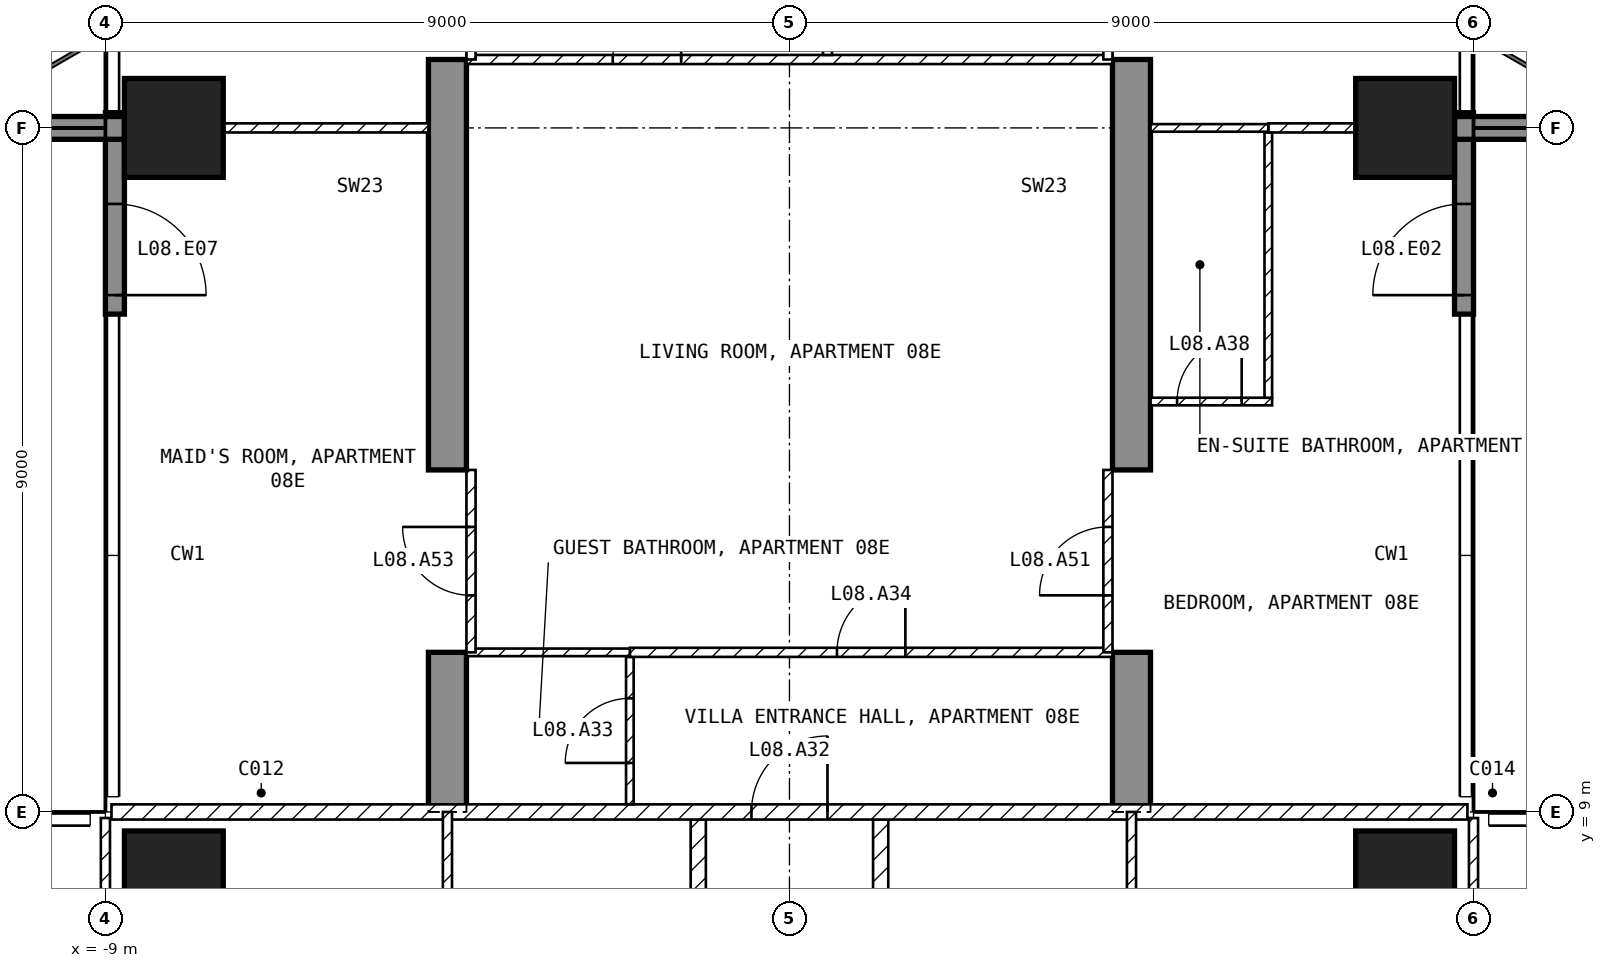
"""IFC4 building model, lengths in metres.
Left out: names, types, materials, properties, quantities, classifications, styles, units other than length and angle.
Written with IfcOpenShell. Run it as: python <this file> out.ifc"""

import sys

from ifc_helpers import new_model, si_unit, direction, frame, frame_2d, origin, origin_2d, place, context, subcontext, project, spatial, polyline, rectangle, outline, extrude, element, fill, save


model = new_model("IFC4")
c1 = context("Model", 3, precision=1e-05, world=origin(), true_north=direction((0.0, 1.0)))
c2 = subcontext(c1, "Body", "Model", "MODEL_VIEW")
j1 = project(units=[si_unit("LENGTHUNIT", "METRE"), si_unit("PLANEANGLEUNIT", "RADIAN")], contexts=[c1])
p1 = place(None, origin())
s1 = spatial("IfcSite", under=j1, at=p1, CompositionType="ELEMENT")
p2 = place(p1, origin())
s2 = spatial("IfcBuilding", under=s1, at=p2, CompositionType="ELEMENT")
p3 = place(p2, frame((0.0, 0.0, 47.0)))
s3 = spatial("IfcBuildingStorey", under=s2, at=p3, CompositionType="ELEMENT", Elevation=47.0)
for number, where, z_axis, x_axis in (
    (1, (-8.1, 8.1, -0.25), (0.0, 0.0, 1.0), (1.0, 0.0, 0.0)),
    (2, (-8.1, 18.0, -0.25), (0.0, 0.0, 1.0), (1.0, 0.0, 0.0)),
    (3, (8.1, 8.1, -0.25), (0.0, 0.0, 1.0), (1.0, 0.0, 0.0)),
    (4, (8.1, 18.0, -0.25), (0.0, 0.0, 1.0), (1.0, 0.0, 0.0)),
):
    element("IfcColumn", number, at=place(p3, frame(where, z_axis=z_axis, x_axis=x_axis)), inside=s3, PredefinedType="COLUMN", context=c2, shape_type="SweptSolid", body=[
        extrude(rectangle(XDim=1.3, YDim=1.3, at=origin_2d()), origin(), (0.0, 0.0, 1.0), 3.5),
    ])
for number, where, z_axis, x_axis in (
    (5, (-4.75, 9.0, -0.25), (1.0, 0.0, 0.0), (0.0, 1.0, 0.0)),
    (6, (4.25, 9.0, -0.25), (1.0, 0.0, 0.0), (0.0, 1.0, 0.0)),
):
    element("IfcWall", number, at=place(p3, frame(where, z_axis=z_axis, x_axis=x_axis)), inside=s3, PredefinedType="SHEAR", context=c2, shape_type="SweptSolid", body=[
        extrude(outline(polyline([(0.0, 0.0), (2.1, 0.0), (2.1, 2.65), (4.5, 2.65), (4.5, 0.0), (9.9, 0.0), (9.9, 2.65), (12.3, 2.65), (12.3, 0.0), (16.45, 0.0), (16.45, 3.5), (0.0, 3.5), (0.0, 0.0)])), origin(), (0.0, 0.0, 1.0), 0.5),
    ])
p4 = place(p3, frame((8.875, 15.55, 0.0), z_axis=(0.0, 0.0, 1.0), x_axis=(0.0, 1.0, 0.0)))
e7 = element("IfcWall", 7, at=p4, inside=s3, PredefinedType="SOLIDWALL", context=c2, shape_type="SweptSolid", body=[
    extrude(rectangle(XDim=2.65, YDim=0.25, at=frame_2d((1.325, 0.0))), origin(), (0.0, 0.0, 1.0), 3.25),
])
p5 = place(p4, frame((0.25, 0.0, 0.0)))
e8 = element("IfcOpeningElement", 8, at=p5, cuts=e7, PredefinedType="OPENING", context=c2, shape_type="SweptSolid", body=[
    extrude(rectangle(XDim=1.2, YDim=2.4, at=frame_2d((0.6, 1.2))), frame((0.0, 0.135, 0.0), z_axis=(0.0, -1.0, 0.0), x_axis=(1.0, 0.0, 0.0)), (0.0, 0.0, 1.0), 0.27),
])
p6 = place(p3, frame((-8.875, 18.2, 0.0), z_axis=(0.0, 0.0, 1.0), x_axis=(0.0, -1.0, 0.0)))
e9 = element("IfcWall", 9, at=p6, inside=s3, PredefinedType="SOLIDWALL", context=c2, shape_type="SweptSolid", body=[
    extrude(rectangle(XDim=2.65, YDim=0.25, at=frame_2d((1.325, 0.0))), origin(), (0.0, 0.0, 1.0), 3.25),
])
p7 = place(p6, frame((1.2, 0.0, 0.0)))
e10 = element("IfcOpeningElement", 10, at=p7, cuts=e9, PredefinedType="OPENING", context=c2, shape_type="SweptSolid", body=[
    extrude(rectangle(XDim=1.2, YDim=2.4, at=frame_2d((0.6, 1.2))), frame((0.0, 0.135, 0.0), z_axis=(0.0, -1.0, 0.0), x_axis=(1.0, 0.0, 0.0)), (0.0, 0.0, 1.0), 0.27),
])
for number, where, z_axis, x_axis in (
    (11, (-8.75, 18.0, 0.0), (0.0, 0.0, 1.0), (-1.0, 0.0, 0.0)),
    (12, (8.75, 18.0, 0.0), (0.0, 0.0, 1.0), (1.0, 0.0, 0.0)),
):
    element("IfcWall", number, at=place(p3, frame(where, z_axis=z_axis, x_axis=x_axis)), inside=s3, PredefinedType="SOLIDWALL", context=c2, shape_type="SweptSolid", body=[
        extrude(rectangle(XDim=2.95, YDim=0.3, at=frame_2d((1.475, 0.0))), origin(), (0.0, 0.0, 1.0), 3.25),
    ])
for number, where, z_axis, x_axis in (
    (13, (1.2, 8.9, 0.0), (0.0, 0.0, 1.0), (0.0, -1.0, 0.0)),
    (14, (-1.2, 1.3, 0.0), (0.0, 0.0, 1.0), (0.0, 1.0, 0.0)),
):
    element("IfcWall", number, at=place(p3, frame(where, z_axis=z_axis, x_axis=x_axis)), inside=s3, PredefinedType="PARTITIONING", context=c2, shape_type="SweptSolid", body=[
        extrude(rectangle(XDim=7.6, YDim=0.2, at=frame_2d((3.8, 0.0))), origin(), (0.0, 0.0, 1.0), 3.25),
    ])
p8 = place(p3, frame((-8.92, 9.0, 0.0), z_axis=(0.0, 0.0, 1.0), x_axis=(1.0, 0.0, 0.0)))
e15 = element("IfcWall", 15, at=p8, inside=s3, PredefinedType="PARTITIONING", context=c2, shape_type="SweptSolid", body=[
    extrude(rectangle(XDim=17.84, YDim=0.2, at=frame_2d((8.92, 0.0))), origin(), (0.0, 0.0, 1.0), 3.25),
])
p9 = place(p8, frame((8.42, 0.0, 0.0)))
e16 = element("IfcOpeningElement", 16, at=p9, cuts=e15, PredefinedType="OPENING", context=c2, shape_type="SweptSolid", body=[
    extrude(rectangle(XDim=1.0, YDim=2.1, at=frame_2d((0.5, 1.05))), frame((0.0, 0.11, 0.0), z_axis=(0.0, -1.0, 0.0), x_axis=(1.0, 0.0, 0.0)), (0.0, 0.0, 1.0), 0.22),
])
p10 = place(p3, frame((9.0, 1.3, 0.0), z_axis=(0.0, 0.0, 1.0), x_axis=(0.0, 1.0, 0.0)))
e17 = element("IfcWall", 17, at=p10, inside=s3, PredefinedType="PARTITIONING", context=c2, shape_type="SweptSolid", body=[
    extrude(rectangle(XDim=7.62, YDim=0.12, at=frame_2d((3.81, 0.0))), origin(), (0.0, 0.0, 1.0), 3.25),
])
p11 = place(p10, frame((0.85, 0.0, 0.0)))
e18 = element("IfcOpeningElement", 18, at=p11, cuts=e17, PredefinedType="OPENING", context=c2, shape_type="SweptSolid", body=[
    extrude(rectangle(XDim=0.9, YDim=2.1, at=frame_2d((0.45, 1.05))), frame((0.0, 0.07, 0.0), z_axis=(0.0, -1.0, 0.0), x_axis=(1.0, 0.0, 0.0)), (0.0, 0.0, 1.0), 0.14),
])
p12 = place(p3, frame((4.5, 1.3, 0.0), z_axis=(0.0, 0.0, 1.0), x_axis=(0.0, 1.0, 0.0)))
e19 = element("IfcWall", 19, at=p12, inside=s3, PredefinedType="PARTITIONING", context=c2, shape_type="SweptSolid", body=[
    extrude(rectangle(XDim=7.7, YDim=0.12, at=frame_2d((3.85, 0.0))), origin(), (0.0, 0.0, 1.0), 3.25),
])
p13 = place(p12, frame((3.4, 0.0, 0.0)))
e20 = element("IfcOpeningElement", 20, at=p13, cuts=e19, PredefinedType="OPENING", context=c2, shape_type="SweptSolid", body=[
    extrude(rectangle(XDim=0.9, YDim=2.1, at=frame_2d((0.45, 1.05))), frame((0.0, 0.07, 0.0), z_axis=(0.0, -1.0, 0.0), x_axis=(1.0, 0.0, 0.0)), (0.0, 0.0, 1.0), 0.14),
])
p14 = place(p3, frame((-9.0, 8.92, 0.0), z_axis=(0.0, 0.0, 1.0), x_axis=(0.0, -1.0, 0.0)))
e21 = element("IfcWall", 21, at=p14, inside=s3, PredefinedType="PARTITIONING", context=c2, shape_type="SweptSolid", body=[
    extrude(rectangle(XDim=7.62, YDim=0.12, at=frame_2d((3.81, 0.0))), origin(), (0.0, 0.0, 1.0), 3.25),
])
p15 = place(p14, frame((2.67, 0.0, 0.0)))
e22 = element("IfcOpeningElement", 22, at=p15, cuts=e21, PredefinedType="OPENING", context=c2, shape_type="SweptSolid", body=[
    extrude(rectangle(XDim=0.9, YDim=2.1, at=frame_2d((0.45, 1.05))), frame((0.0, 0.07, 0.0), z_axis=(0.0, -1.0, 0.0), x_axis=(1.0, 0.0, 0.0)), (0.0, 0.0, 1.0), 0.14),
])
p16 = place(p3, frame((-4.5, 9.0, 0.0), z_axis=(0.0, 0.0, 1.0), x_axis=(0.0, -1.0, 0.0)))
e23 = element("IfcWall", 23, at=p16, inside=s3, PredefinedType="PARTITIONING", context=c2, shape_type="SweptSolid", body=[
    extrude(rectangle(XDim=3.9, YDim=0.12, at=frame_2d((1.95, 0.0))), origin(), (0.0, 0.0, 1.0), 3.25),
])
p17 = place(p16, frame((1.5, 0.0, 0.0)))
e24 = element("IfcOpeningElement", 24, at=p17, cuts=e23, PredefinedType="OPENING", context=c2, shape_type="SweptSolid", body=[
    extrude(rectangle(XDim=0.9, YDim=2.1, at=frame_2d((0.45, 1.05))), frame((0.0, 0.07, 0.0), z_axis=(0.0, -1.0, 0.0), x_axis=(1.0, 0.0, 0.0)), (0.0, 0.0, 1.0), 0.14),
])
p18 = place(p3, frame((-2.1, 9.1, 0.0), z_axis=(0.0, 0.0, 1.0), x_axis=(0.0, 1.0, 0.0)))
e25 = element("IfcWall", 25, at=p18, inside=s3, PredefinedType="PARTITIONING", context=c2, shape_type="SweptSolid", body=[
    extrude(rectangle(XDim=1.94, YDim=0.1, at=frame_2d((0.97, 0.0))), origin(), (0.0, 0.0, 1.0), 3.25),
])
p19 = place(p18, frame((0.545, 0.0, 0.0)))
e26 = element("IfcOpeningElement", 26, at=p19, cuts=e25, PredefinedType="OPENING", context=c2, shape_type="SweptSolid", body=[
    extrude(rectangle(XDim=0.85, YDim=2.1, at=frame_2d((0.425, 1.05))), frame((0.0, 0.06, 0.0), z_axis=(0.0, -1.0, 0.0), x_axis=(1.0, 0.0, 0.0)), (0.0, 0.0, 1.0), 0.12),
])
p20 = place(p3, frame((-2.1, 11.1, 0.0), z_axis=(0.0, 0.0, 1.0), x_axis=(1.0, 0.0, 0.0)))
e27 = element("IfcWall", 27, at=p20, inside=s3, PredefinedType="PARTITIONING", context=c2, shape_type="SweptSolid", body=[
    extrude(rectangle(XDim=6.35, YDim=0.12, at=frame_2d((3.175, 0.0))), origin(), (0.0, 0.0, 1.0), 3.25),
])
p21 = place(p20, frame((2.725, 0.0, 0.0)))
e28 = element("IfcOpeningElement", 28, at=p21, cuts=e27, PredefinedType="OPENING", context=c2, shape_type="SweptSolid", body=[
    extrude(rectangle(XDim=0.9, YDim=2.1, at=frame_2d((0.45, 1.05))), frame((0.0, 0.07, 0.0), z_axis=(0.0, -1.0, 0.0), x_axis=(1.0, 0.0, 0.0)), (0.0, 0.0, 1.0), 0.14),
])
p22 = place(p3, frame((-4.25, 11.1, 0.0), z_axis=(0.0, 0.0, 1.0), x_axis=(1.0, 0.0, 0.0)))
e29 = element("IfcWall", 29, at=p22, inside=s3, PredefinedType="PARTITIONING", context=c2, shape_type="SweptSolid", body=[
    extrude(rectangle(XDim=2.15, YDim=0.1, at=frame_2d((1.075, 0.0))), origin(), (0.0, 0.0, 1.0), 3.25),
])
p23 = place(p3, frame((-4.25, 18.9, 0.0), z_axis=(0.0, 0.0, 1.0), x_axis=(1.0, 0.0, 0.0)))
e30 = element("IfcWall", 30, at=p23, inside=s3, PredefinedType="PARTITIONING", context=c2, shape_type="SweptSolid", body=[
    extrude(rectangle(XDim=8.5, YDim=0.12, at=frame_2d((4.25, 0.0))), origin(), (0.0, 0.0, 1.0), 3.25),
])
p24 = place(p23, frame((1.925, 0.0, 0.0)))
e31 = element("IfcOpeningElement", 31, at=p24, cuts=e30, PredefinedType="OPENING", context=c2, shape_type="SweptSolid", body=[
    extrude(rectangle(XDim=0.9, YDim=2.1, at=frame_2d((0.45, 1.05))), frame((0.0, 0.07, 0.0), z_axis=(0.0, -1.0, 0.0), x_axis=(1.0, 0.0, 0.0)), (0.0, 0.0, 1.0), 0.14),
])
p25 = place(p3, frame((0.5, 23.34, 0.0), z_axis=(0.0, 0.0, 1.0), x_axis=(0.0, -1.0, 0.0)))
e32 = element("IfcWall", 32, at=p25, inside=s3, PredefinedType="PARTITIONING", context=c2, shape_type="SweptSolid", body=[
    extrude(rectangle(XDim=4.38, YDim=0.12, at=frame_2d((2.19, 0.0))), origin(), (0.0, 0.0, 1.0), 3.25),
])
p26 = place(p25, frame((1.74, 0.0, 0.0)))
e33 = element("IfcOpeningElement", 33, at=p26, cuts=e32, PredefinedType="OPENING", context=c2, shape_type="SweptSolid", body=[
    extrude(rectangle(XDim=0.9, YDim=2.1, at=frame_2d((0.45, 1.05))), frame((0.0, 0.07, 0.0), z_axis=(0.0, -1.0, 0.0), x_axis=(1.0, 0.0, 0.0)), (0.0, 0.0, 1.0), 0.14),
])
p27 = place(p3, frame((4.75, 14.4, 0.0), z_axis=(0.0, 0.0, 1.0), x_axis=(1.0, 0.0, 0.0)))
e34 = element("IfcWall", 34, at=p27, inside=s3, PredefinedType="PARTITIONING", context=c2, shape_type="SweptSolid", body=[
    extrude(rectangle(XDim=1.6, YDim=0.1, at=frame_2d((0.8, 0.0))), origin(), (0.0, 0.0, 1.0), 3.25),
])
p28 = place(p27, frame((0.35, 0.0, 0.0)))
e35 = element("IfcOpeningElement", 35, at=p28, cuts=e34, PredefinedType="OPENING", context=c2, shape_type="SweptSolid", body=[
    extrude(rectangle(XDim=0.85, YDim=2.1, at=frame_2d((0.425, 1.05))), frame((0.0, 0.06, 0.0), z_axis=(0.0, -1.0, 0.0), x_axis=(1.0, 0.0, 0.0)), (0.0, 0.0, 1.0), 0.12),
])
p29 = place(p3, frame((6.3, 14.45, 0.0), z_axis=(0.0, 0.0, 1.0), x_axis=(0.0, 1.0, 0.0)))
e36 = element("IfcWall", 36, at=p29, inside=s3, PredefinedType="PARTITIONING", context=c2, shape_type="SweptSolid", body=[
    extrude(rectangle(XDim=3.49, YDim=0.1, at=frame_2d((1.745, 0.0))), origin(), (0.0, 0.0, 1.0), 3.25),
])
p30 = place(p3, frame((6.3, 18.0, 0.0), z_axis=(0.0, 0.0, 1.0), x_axis=(1.0, 0.0, 0.0)))
e37 = element("IfcWall", 37, at=p30, inside=s3, PredefinedType="PARTITIONING", context=c2, shape_type="SweptSolid", body=[
    extrude(rectangle(XDim=1.15, YDim=0.12, at=frame_2d((0.575, 0.0))), origin(), (0.0, 0.0, 1.0), 2.346),
])
p31 = place(p3, frame((4.75, 18.0, 0.0), z_axis=(0.0, 0.0, 1.0), x_axis=(1.0, 0.0, 0.0)))
e38 = element("IfcWall", 38, at=p31, inside=s3, PredefinedType="PARTITIONING", context=c2, shape_type="SweptSolid", body=[
    extrude(rectangle(XDim=1.55, YDim=0.1, at=frame_2d((0.775, 0.0))), origin(), (0.0, 0.0, 1.0), 2.346),
])
p32 = place(p3, frame((-7.45, 18.0, 0.0), z_axis=(0.0, 0.0, 1.0), x_axis=(1.0, 0.0, 0.0)))
e39 = element("IfcWall", 39, at=p32, inside=s3, PredefinedType="PARTITIONING", context=c2, shape_type="SweptSolid", body=[
    extrude(rectangle(XDim=2.7, YDim=0.12, at=frame_2d((1.35, 0.0))), origin(), (0.0, 0.0, 1.0), 2.346),
])
p33 = place(p3, frame((4.19, 11.1, 0.0), z_axis=(0.0, 0.0, 1.0), x_axis=(0.0, 1.0, 0.0)))
e40 = element("IfcWall", 40, at=p33, inside=s3, PredefinedType="PARTITIONING", context=c2, shape_type="SweptSolid", body=[
    extrude(rectangle(XDim=2.4, YDim=0.12, at=frame_2d((1.2, 0.0))), origin(), (0.0, 0.0, 1.0), 2.4),
])
p34 = place(p33, frame((0.75, 0.0, 0.0)))
e41 = element("IfcOpeningElement", 41, at=p34, cuts=e40, PredefinedType="OPENING", context=c2, shape_type="SweptSolid", body=[
    extrude(rectangle(XDim=0.9, YDim=2.1, at=frame_2d((0.45, 1.05))), frame((0.0, 0.07, 0.0), z_axis=(0.0, -1.0, 0.0), x_axis=(1.0, 0.0, 0.0)), (0.0, 0.0, 1.0), 0.14),
])
p35 = place(p3, frame((4.19, 18.9, 0.0), z_axis=(0.0, 0.0, 1.0), x_axis=(0.0, 1.0, 0.0)))
e42 = element("IfcWall", 42, at=p35, inside=s3, PredefinedType="PARTITIONING", context=c2, shape_type="SweptSolid", body=[
    extrude(rectangle(XDim=2.4, YDim=0.12, at=frame_2d((1.2, 0.0))), origin(), (0.0, 0.0, 1.0), 2.4),
])
p36 = place(p35, frame((0.75, 0.0, 0.0)))
e43 = element("IfcOpeningElement", 43, at=p36, cuts=e42, PredefinedType="OPENING", context=c2, shape_type="SweptSolid", body=[
    extrude(rectangle(XDim=0.9, YDim=2.1, at=frame_2d((0.45, 1.05))), frame((0.0, 0.07, 0.0), z_axis=(0.0, -1.0, 0.0), x_axis=(1.0, 0.0, 0.0)), (0.0, 0.0, 1.0), 0.14),
])
p37 = place(p3, frame((-4.19, 11.1, 0.0), z_axis=(0.0, 0.0, 1.0), x_axis=(0.0, 1.0, 0.0)))
e44 = element("IfcWall", 44, at=p37, inside=s3, PredefinedType="PARTITIONING", context=c2, shape_type="SweptSolid", body=[
    extrude(rectangle(XDim=2.4, YDim=0.12, at=frame_2d((1.2, 0.0))), origin(), (0.0, 0.0, 1.0), 2.4),
])
p38 = place(p37, frame((0.75, 0.0, 0.0)))
e45 = element("IfcOpeningElement", 45, at=p38, cuts=e44, PredefinedType="OPENING", context=c2, shape_type="SweptSolid", body=[
    extrude(rectangle(XDim=0.9, YDim=2.1, at=frame_2d((0.45, 1.05))), frame((0.0, 0.07, 0.0), z_axis=(0.0, -1.0, 0.0), x_axis=(1.0, 0.0, 0.0)), (0.0, 0.0, 1.0), 0.14),
])
p39 = place(p3, frame((-4.19, 18.9, 0.0), z_axis=(0.0, 0.0, 1.0), x_axis=(0.0, 1.0, 0.0)))
e46 = element("IfcWall", 46, at=p39, inside=s3, PredefinedType="PARTITIONING", context=c2, shape_type="SweptSolid", body=[
    extrude(rectangle(XDim=2.4, YDim=0.12, at=frame_2d((1.2, 0.0))), origin(), (0.0, 0.0, 1.0), 2.4),
])
p40 = place(p39, frame((0.75, 0.0, 0.0)))
e47 = element("IfcOpeningElement", 47, at=p40, cuts=e46, PredefinedType="OPENING", context=c2, shape_type="SweptSolid", body=[
    extrude(rectangle(XDim=0.9, YDim=2.1, at=frame_2d((0.45, 1.05))), frame((0.0, 0.07, 0.0), z_axis=(0.0, -1.0, 0.0), x_axis=(1.0, 0.0, 0.0)), (0.0, 0.0, 1.0), 0.14),
])
p41 = place(p5, origin())
e48 = element("IfcDoor", 48, at=p41, inside=s3, OperationType="SINGLE_SWING_LEFT", PredefinedType="DOOR", context=c2, shape_type="SweptSolid", body=[
    extrude(rectangle(XDim=1.2, YDim=2.4, at=frame_2d((0.6, 1.2))), frame((0.0, 0.025, 0.0), z_axis=(0.0, -1.0, 0.0), x_axis=(1.0, 0.0, 0.0)), (0.0, 0.0, 1.0), 0.05),
])
fill(e8, e48)
p42 = place(p7, origin())
e49 = element("IfcDoor", 49, at=p42, inside=s3, OperationType="SINGLE_SWING_RIGHT", PredefinedType="DOOR", context=c2, shape_type="SweptSolid", body=[
    extrude(rectangle(XDim=1.2, YDim=2.4, at=frame_2d((0.6, 1.2))), frame((0.0, 0.025, 0.0), z_axis=(0.0, -1.0, 0.0), x_axis=(1.0, 0.0, 0.0)), (0.0, 0.0, 1.0), 0.05),
])
fill(e10, e49)
p43 = place(p9, origin())
e50 = element("IfcDoor", 50, at=p43, inside=s3, OperationType="SINGLE_SWING_RIGHT", PredefinedType="DOOR", context=c2, shape_type="SweptSolid", body=[
    extrude(rectangle(XDim=1.0, YDim=2.1, at=frame_2d((0.5, 1.05))), frame((0.0, 0.025, 0.0), z_axis=(0.0, -1.0, 0.0), x_axis=(1.0, 0.0, 0.0)), (0.0, 0.0, 1.0), 0.05),
])
fill(e16, e50)
p44 = place(p19, origin())
e51 = element("IfcDoor", 51, at=p44, inside=s3, OperationType="SINGLE_SWING_LEFT", PredefinedType="DOOR", context=c2, shape_type="SweptSolid", body=[
    extrude(rectangle(XDim=0.85, YDim=2.1, at=frame_2d((0.425, 1.05))), frame((0.0, 0.025, 0.0), z_axis=(0.0, -1.0, 0.0), x_axis=(1.0, 0.0, 0.0)), (0.0, 0.0, 1.0), 0.05),
])
fill(e26, e51)
p45 = place(p21, origin())
e52 = element("IfcDoor", 52, at=p45, inside=s3, OperationType="SINGLE_SWING_RIGHT", PredefinedType="DOOR", context=c2, shape_type="SweptSolid", body=[
    extrude(rectangle(XDim=0.9, YDim=2.1, at=frame_2d((0.45, 1.05))), frame((0.0, 0.025, 0.0), z_axis=(0.0, -1.0, 0.0), x_axis=(1.0, 0.0, 0.0)), (0.0, 0.0, 1.0), 0.05),
])
fill(e28, e52)
p46 = place(p24, origin())
e53 = element("IfcDoor", 53, at=p46, inside=s3, OperationType="SINGLE_SWING_RIGHT", PredefinedType="DOOR", context=c2, shape_type="SweptSolid", body=[
    extrude(rectangle(XDim=0.9, YDim=2.1, at=frame_2d((0.45, 1.05))), frame((0.0, 0.025, 0.0), z_axis=(0.0, -1.0, 0.0), x_axis=(1.0, 0.0, 0.0)), (0.0, 0.0, 1.0), 0.05),
])
fill(e31, e53)
p47 = place(p28, origin())
e54 = element("IfcDoor", 54, at=p47, inside=s3, OperationType="SINGLE_SWING_RIGHT", PredefinedType="DOOR", context=c2, shape_type="SweptSolid", body=[
    extrude(rectangle(XDim=0.85, YDim=2.1, at=frame_2d((0.425, 1.05))), frame((0.0, 0.025, 0.0), z_axis=(0.0, -1.0, 0.0), x_axis=(1.0, 0.0, 0.0)), (0.0, 0.0, 1.0), 0.05),
])
fill(e35, e54)
p48 = place(p34, origin())
e55 = element("IfcDoor", 55, at=p48, inside=s3, OperationType="SINGLE_SWING_LEFT", PredefinedType="DOOR", context=c2, shape_type="SweptSolid", body=[
    extrude(rectangle(XDim=0.9, YDim=2.1, at=frame_2d((0.45, 1.05))), frame((0.0, 0.025, 0.0), z_axis=(0.0, -1.0, 0.0), x_axis=(1.0, 0.0, 0.0)), (0.0, 0.0, 1.0), 0.05),
])
fill(e41, e55)
p49 = place(p38, origin())
e56 = element("IfcDoor", 56, at=p49, inside=s3, OperationType="SINGLE_SWING_RIGHT", PredefinedType="DOOR", context=c2, shape_type="SweptSolid", body=[
    extrude(rectangle(XDim=0.9, YDim=2.1, at=frame_2d((0.45, 1.05))), frame((0.0, 0.025, 0.0), z_axis=(0.0, -1.0, 0.0), x_axis=(1.0, 0.0, 0.0)), (0.0, 0.0, 1.0), 0.05),
])
fill(e45, e56)
save(model, sys.argv[1])
